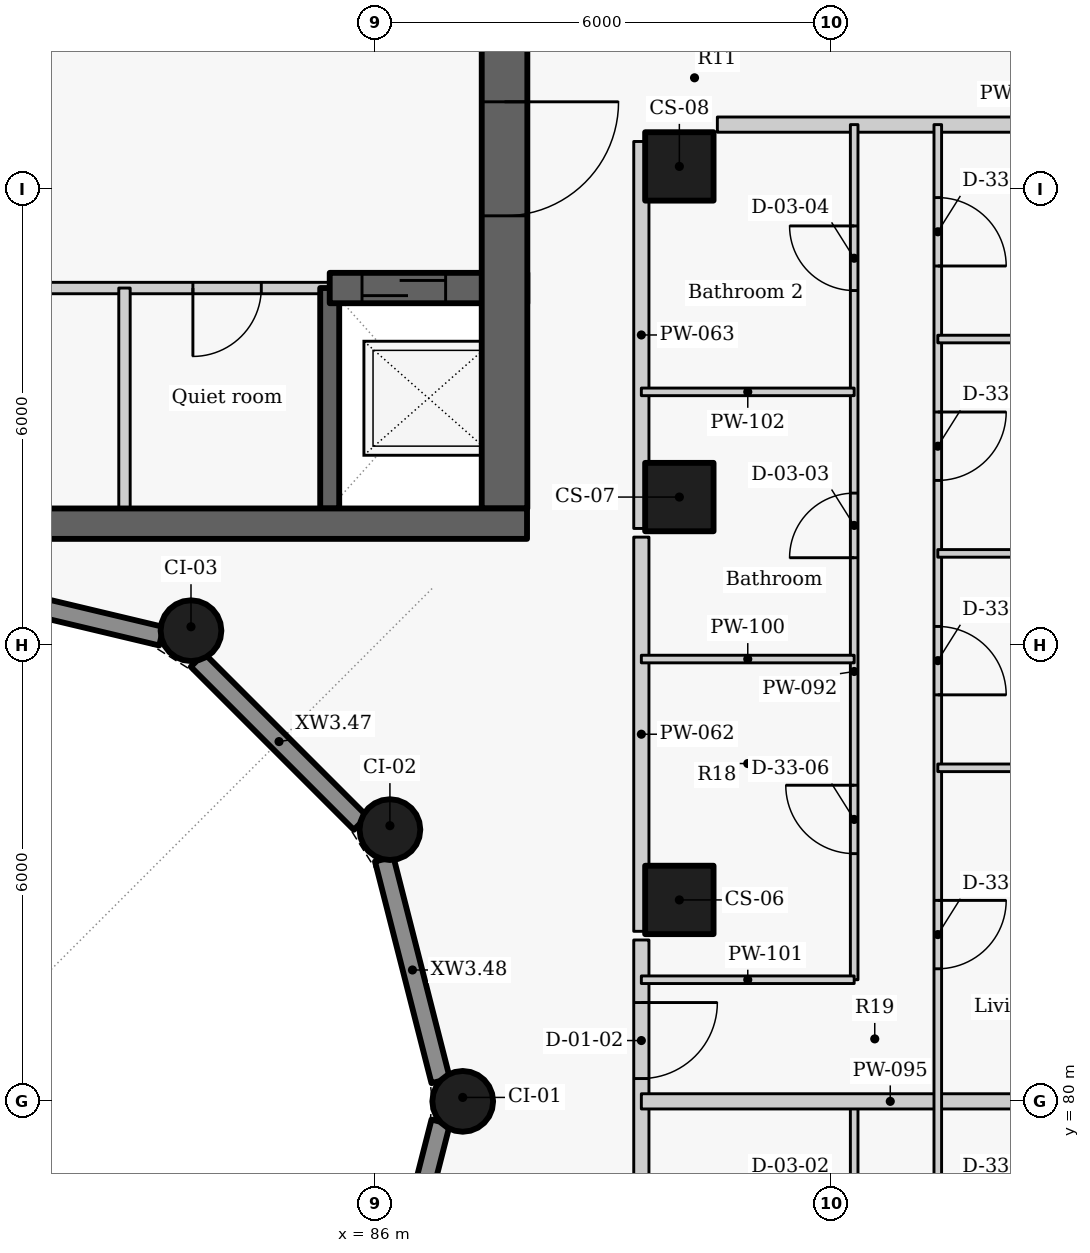
"""IFC4 building model, lengths in metres.
Left out: names, types, materials, properties, quantities, classifications, styles, units other than length and angle.
Written with IfcOpenShell. Run it as: python <this file> out.ifc"""

import sys

from ifc_helpers import new_model, si_unit, direction, frame, frame_2d, origin, origin_2d, place, context, subcontext, project, spatial, rectangle, circle, extrude, element, fill, save


model = new_model("IFC4")
c1 = context("Model", 3, precision=1e-05, world=origin(), true_north=direction((0.0, 1.0)))
c2 = subcontext(c1, "Body", "Model", "MODEL_VIEW")
j1 = project(units=[si_unit("LENGTHUNIT", "METRE"), si_unit("PLANEANGLEUNIT", "RADIAN")], contexts=[c1])
p1 = place(None, origin())
s1 = spatial("IfcSite", under=j1, at=p1, CompositionType="ELEMENT")
p2 = place(p1, origin())
s2 = spatial("IfcBuilding", under=s1, at=p2, CompositionType="ELEMENT")
p3 = place(p2, frame((0.0, 0.0, 229.5)))
s3 = spatial("IfcBuildingStorey", under=s2, at=p3, CompositionType="ELEMENT", Elevation=229.5)
for number, where, z_axis, x_axis in (
    (1, (90.0, 82.65, 0.0), (0.0, 0.0, 1.0), (0.0, 1.0, 0.0)),
    (2, (90.0, 87.95, 0.0), (0.0, 0.0, 1.0), (0.0, 1.0, 0.0)),
    (3, (90.0, 92.3, 0.0), (0.0, 0.0, 1.0), (0.0, 1.0, 0.0)),
):
    element("IfcColumn", number, at=place(p3, frame(where, z_axis=z_axis, x_axis=x_axis)), inside=s3, PredefinedType="COLUMN", context=c2, shape_type="SweptSolid", body=[
        extrude(rectangle(XDim=0.9, YDim=0.9, at=origin_2d()), origin(), (0.0, 0.0, 1.0), 3.3),
    ])
for number, where, z_axis, x_axis in (
    (4, (87.15, 80.0, 0.0), (0.0, 0.0, 1.0), (0.0, 1.0, 0.0)),
    (5, (86.192, 83.575, 0.0), (0.0, 0.0, 1.0), (-0.5, 0.866, 0.0)),
    (6, (83.575, 86.192, 0.0), (0.0, 0.0, 1.0), (-0.866, 0.5, 0.0)),
):
    element("IfcColumn", number, at=place(p3, frame(where, z_axis=z_axis, x_axis=x_axis)), inside=s3, PredefinedType="COLUMN", context=c2, shape_type="SweptSolid", body=[
        extrude(circle(Radius=0.4, at=origin_2d()), origin(), (0.0, 0.0, 1.0), 3.3),
    ])
p4 = place(p3, frame((86.86, 79.73, 0.0), z_axis=(0.0, 0.0, 1.0), x_axis=(-0.247055971283, -0.969001211069, 0.0)))
e7 = element("IfcWall", 7, at=p4, inside=s3, PredefinedType="SOLIDWALL", context=c2, shape_type="SweptSolid", body=[
    extrude(rectangle(XDim=3.01, YDim=0.25, at=frame_2d((1.505, 0.0))), origin(), (0.0, 0.0, 1.0), 2.425),
])
p5 = place(p3, frame((80.029, 86.872, 0.0), z_axis=(0.0, 0.0, 1.0), x_axis=(0.972773113459, -0.231759508395, 0.0)))
e8 = element("IfcWall", 8, at=p5, inside=s3, PredefinedType="SOLIDWALL", context=c2, shape_type="SweptSolid", body=[
    extrude(rectangle(XDim=3.246, YDim=0.25, at=frame_2d((1.623, 0.0))), origin(), (0.0, 0.0, 1.0), 2.425),
])
p6 = place(p3, frame((83.661, 85.806, 0.0), z_axis=(0.0, 0.0, 1.0), x_axis=(0.707106781187, -0.707106781187, 0.0)))
e9 = element("IfcWall", 9, at=p6, inside=s3, PredefinedType="SOLIDWALL", context=c2, shape_type="SweptSolid", body=[
    extrude(rectangle(XDim=3.033, YDim=0.25, at=frame_2d((1.517, 0.0))), origin(), (0.0, 0.0, 1.0), 2.425),
])
p7 = place(p3, frame((86.117, 83.187, 0.0), z_axis=(0.0, 0.0, 1.0), x_axis=(0.247055971283, -0.969001211069, 0.0)))
e10 = element("IfcWall", 10, at=p7, inside=s3, PredefinedType="SOLIDWALL", context=c2, shape_type="SweptSolid", body=[
    extrude(rectangle(XDim=3.01, YDim=0.25, at=frame_2d((1.505, 0.0))), origin(), (0.0, 0.0, 1.0), 2.425),
])
p8 = place(p3, frame((85.4, 90.7, 0.0), z_axis=(0.0, 0.0, 1.0), x_axis=(-1.0, 0.0, 0.0)))
e11 = element("IfcWall", 11, at=p8, inside=s3, PredefinedType="PARTITIONING", context=c2, shape_type="SweptSolid", body=[
    extrude(rectangle(XDim=13.4, YDim=0.15, at=frame_2d((6.7, 0.0))), origin(), (0.0, 0.0, 1.0), 3.025),
])
p9 = place(p8, frame((11.325, 0.0, 0.0)))
e12 = element("IfcOpeningElement", 12, at=p9, cuts=e11, PredefinedType="OPENING", context=c2, shape_type="SweptSolid", body=[
    extrude(rectangle(XDim=0.9, YDim=2.1, at=frame_2d((0.45, 1.05))), frame((0.0, 0.085, 0.0), z_axis=(0.0, -1.0, 0.0), x_axis=(1.0, 0.0, 0.0)), (0.0, 0.0, 1.0), 0.17),
])
p10 = place(p8, frame((6.3, 0.0, 0.0)))
e13 = element("IfcOpeningElement", 13, at=p10, cuts=e11, PredefinedType="OPENING", context=c2, shape_type="SweptSolid", body=[
    extrude(rectangle(XDim=0.9, YDim=2.1, at=frame_2d((0.45, 1.05))), frame((0.0, 0.085, 0.0), z_axis=(0.0, -1.0, 0.0), x_axis=(1.0, 0.0, 0.0)), (0.0, 0.0, 1.0), 0.17),
])
p11 = place(p8, frame((0.9, 0.0, 0.0)))
e14 = element("IfcOpeningElement", 14, at=p11, cuts=e11, PredefinedType="OPENING", context=c2, shape_type="SweptSolid", body=[
    extrude(rectangle(XDim=0.9, YDim=2.1, at=frame_2d((0.45, 1.05))), frame((0.0, 0.085, 0.0), z_axis=(0.0, -1.0, 0.0), x_axis=(1.0, 0.0, 0.0)), (0.0, 0.0, 1.0), 0.17),
])
p12 = place(p3, frame((85.4, 87.8, -0.275), z_axis=(0.0, 0.0, 1.0), x_axis=(0.0, 1.0, 0.0)))
e15 = element("IfcWall", 15, at=p12, inside=s3, PredefinedType="SHEAR", context=c2, shape_type="SweptSolid", body=[
    extrude(rectangle(XDim=2.9, YDim=0.25, at=frame_2d((1.45, 0.0))), origin(), (0.0, 0.0, 1.0), 3.3),
])
p13 = place(p3, frame((85.4, 90.7, -0.275), z_axis=(0.0, 0.0, 1.0), x_axis=(1.0, 0.0, 0.0)))
e16 = element("IfcWall", 16, at=p13, inside=s3, PredefinedType="SHEAR", context=c2, shape_type="SweptSolid", body=[
    extrude(rectangle(XDim=2.6, YDim=0.4, at=frame_2d((1.3, 0.0))), origin(), (0.0, 0.0, 1.0), 3.3),
])
p14 = place(p13, frame((0.425, 0.0, 0.275)))
e17 = element("IfcOpeningElement", 17, at=p14, cuts=e16, PredefinedType="OPENING", context=c2, shape_type="SweptSolid", body=[
    extrude(rectangle(XDim=1.1, YDim=2.1, at=frame_2d((0.55, 1.05))), frame((0.0, 0.21, 0.0), z_axis=(0.0, -1.0, 0.0), x_axis=(1.0, 0.0, 0.0)), (0.0, 0.0, 1.0), 0.42),
])
p15 = place(p3, frame((87.7, 102.05, -0.275), z_axis=(0.0, 0.0, 1.0), x_axis=(0.0, -1.0, 0.0)))
e18 = element("IfcWall", 18, at=p15, inside=s3, PredefinedType="SHEAR", context=c2, shape_type="SweptSolid", body=[
    extrude(rectangle(XDim=14.25, YDim=0.6, at=frame_2d((7.125, 0.0))), origin(), (0.0, 0.0, 1.0), 3.3),
])
p16 = place(p15, frame((8.9, 0.0, 0.275)))
e19 = element("IfcOpeningElement", 19, at=p16, cuts=e18, PredefinedType="OPENING", context=c2, shape_type="SweptSolid", body=[
    extrude(rectangle(XDim=1.5, YDim=2.1, at=frame_2d((0.75, 1.05))), frame((0.0, 0.31, 0.0), z_axis=(0.0, -1.0, 0.0), x_axis=(1.0, 0.0, 0.0)), (0.0, 0.0, 1.0), 0.62),
])
p17 = place(p15, frame((2.025, 0.0, 0.275)))
e20 = element("IfcOpeningElement", 20, at=p17, cuts=e18, PredefinedType="OPENING", context=c2, shape_type="SweptSolid", body=[
    extrude(rectangle(XDim=1.1, YDim=2.1, at=frame_2d((0.55, 1.05))), frame((0.0, 0.31, 0.0), z_axis=(0.0, -1.0, 0.0), x_axis=(1.0, 0.0, 0.0)), (0.0, 0.0, 1.0), 0.62),
])
p18 = place(p3, frame((82.7, 87.8, 0.0), z_axis=(0.0, 0.0, 1.0), x_axis=(0.0, 1.0, 0.0)))
e21 = element("IfcWall", 21, at=p18, inside=s3, PredefinedType="PARTITIONING", context=c2, shape_type="SweptSolid", body=[
    extrude(rectangle(XDim=2.9, YDim=0.15, at=frame_2d((1.45, 0.0))), origin(), (0.0, 0.0, 1.0), 3.025),
])
p19 = place(p3, frame((89.5, 82.123, 0.0), z_axis=(0.0, 0.0, 1.0), x_axis=(0.0, -1.0, 0.0)))
e22 = element("IfcWall", 22, at=p19, inside=s3, PredefinedType="PARTITIONING", context=c2, shape_type="SweptSolid", body=[
    extrude(rectangle(XDim=10.486, YDim=0.2, at=frame_2d((5.243, 0.0))), origin(), (0.0, 0.0, 1.0), 3.025),
])
p20 = place(p19, frame((0.823, 0.0, 0.0)))
e23 = element("IfcOpeningElement", 23, at=p20, cuts=e22, PredefinedType="OPENING", context=c2, shape_type="SweptSolid", body=[
    extrude(rectangle(XDim=1.0, YDim=2.1, at=frame_2d((0.5, 1.05))), frame((0.0, 0.11, 0.0), z_axis=(0.0, -1.0, 0.0), x_axis=(1.0, 0.0, 0.0)), (0.0, 0.0, 1.0), 0.22),
])
p21 = place(p3, frame((89.5, 82.237, 0.0), z_axis=(0.0, 0.0, 1.0), x_axis=(0.0, 1.0, 0.0)))
e24 = element("IfcWall", 24, at=p21, inside=s3, PredefinedType="PARTITIONING", context=c2, shape_type="SweptSolid", body=[
    extrude(rectangle(XDim=5.186, YDim=0.2, at=frame_2d((2.593, 0.0))), origin(), (0.0, 0.0, 1.0), 3.025),
])
p22 = place(p3, frame((89.5, 87.537, 0.0), z_axis=(0.0, 0.0, 1.0), x_axis=(0.0, 1.0, 0.0)))
e25 = element("IfcWall", 25, at=p22, inside=s3, PredefinedType="PARTITIONING", context=c2, shape_type="SweptSolid", body=[
    extrude(rectangle(XDim=5.091, YDim=0.2, at=frame_2d((2.545, 0.0))), origin(), (0.0, 0.0, 1.0), 3.025),
])
p23 = place(p3, frame((90.5, 92.85, 0.0), z_axis=(0.0, 0.0, 1.0), x_axis=(1.0, 0.0, 0.0)))
e26 = element("IfcWall", 26, at=p23, inside=s3, PredefinedType="PARTITIONING", context=c2, shape_type="SweptSolid", body=[
    extrude(rectangle(XDim=7.889, YDim=0.2, at=frame_2d((3.944, 0.0))), origin(), (0.0, 0.0, 1.0), 2.405),
])
p24 = place(p3, frame((92.3, 70.2, 0.0), z_axis=(0.0, 0.0, 1.0), x_axis=(0.0, 1.0, 0.0)))
e27 = element("IfcWall", 27, at=p24, inside=s3, PredefinedType="PARTITIONING", context=c2, shape_type="SweptSolid", body=[
    extrude(rectangle(XDim=9.8, YDim=0.1, at=frame_2d((4.9, 0.0))), origin(), (0.0, 0.0, 1.0), 3.025),
])
p25 = place(p24, frame((1.388, 0.0, 0.0)))
e28 = element("IfcOpeningElement", 28, at=p25, cuts=e27, PredefinedType="OPENING", context=c2, shape_type="SweptSolid", body=[
    extrude(rectangle(XDim=0.9, YDim=2.1, at=frame_2d((0.45, 1.05))), frame((0.0, 0.06, 0.0), z_axis=(0.0, -1.0, 0.0), x_axis=(1.0, 0.0, 0.0)), (0.0, 0.0, 1.0), 0.12),
])
p26 = place(p24, frame((4.781, 0.0, 0.0)))
e29 = element("IfcOpeningElement", 29, at=p26, cuts=e27, PredefinedType="OPENING", context=c2, shape_type="SweptSolid", body=[
    extrude(rectangle(XDim=0.85, YDim=2.1, at=frame_2d((0.425, 1.05))), frame((0.0, 0.06, 0.0), z_axis=(0.0, -1.0, 0.0), x_axis=(1.0, 0.0, 0.0)), (0.0, 0.0, 1.0), 0.12),
])
p27 = place(p24, frame((7.844, 0.0, 0.0)))
e30 = element("IfcOpeningElement", 30, at=p27, cuts=e27, PredefinedType="OPENING", context=c2, shape_type="SweptSolid", body=[
    extrude(rectangle(XDim=0.85, YDim=2.1, at=frame_2d((0.425, 1.05))), frame((0.0, 0.06, 0.0), z_axis=(0.0, -1.0, 0.0), x_axis=(1.0, 0.0, 0.0)), (0.0, 0.0, 1.0), 0.12),
])
p28 = place(p3, frame((92.3, 81.6, 0.0), z_axis=(0.0, 0.0, 1.0), x_axis=(0.0, 1.0, 0.0)))
e31 = element("IfcWall", 31, at=p28, inside=s3, PredefinedType="PARTITIONING", context=c2, shape_type="SweptSolid", body=[
    extrude(rectangle(XDim=11.25, YDim=0.1, at=frame_2d((5.625, 0.0))), origin(), (0.0, 0.0, 1.0), 3.025),
])
p29 = place(p28, frame((1.659, 0.0, 0.0)))
e32 = element("IfcOpeningElement", 32, at=p29, cuts=e31, PredefinedType="OPENING", context=c2, shape_type="SweptSolid", body=[
    extrude(rectangle(XDim=0.9, YDim=2.1, at=frame_2d((0.45, 1.05))), frame((0.0, 0.06, 0.0), z_axis=(0.0, -1.0, 0.0), x_axis=(1.0, 0.0, 0.0)), (0.0, 0.0, 1.0), 0.12),
])
p30 = place(p28, frame((5.552, 0.0, 0.0)))
e33 = element("IfcOpeningElement", 33, at=p30, cuts=e31, PredefinedType="OPENING", context=c2, shape_type="SweptSolid", body=[
    extrude(rectangle(XDim=0.85, YDim=2.1, at=frame_2d((0.425, 1.05))), frame((0.0, 0.06, 0.0), z_axis=(0.0, -1.0, 0.0), x_axis=(1.0, 0.0, 0.0)), (0.0, 0.0, 1.0), 0.12),
])
p31 = place(p28, frame((9.067, 0.0, 0.0)))
e34 = element("IfcOpeningElement", 34, at=p31, cuts=e31, PredefinedType="OPENING", context=c2, shape_type="SweptSolid", body=[
    extrude(rectangle(XDim=0.85, YDim=2.1, at=frame_2d((0.425, 1.05))), frame((0.0, 0.06, 0.0), z_axis=(0.0, -1.0, 0.0), x_axis=(1.0, 0.0, 0.0)), (0.0, 0.0, 1.0), 0.12),
])
p32 = place(p3, frame((89.5, 80.0, 0.0), z_axis=(0.0, 0.0, 1.0), x_axis=(1.0, 0.0, 0.0)))
e35 = element("IfcWall", 35, at=p32, inside=s3, PredefinedType="PARTITIONING", context=c2, shape_type="SweptSolid", body=[
    extrude(rectangle(XDim=6.55, YDim=0.2, at=frame_2d((3.275, 0.0))), origin(), (0.0, 0.0, 1.0), 2.405),
])
p33 = place(p3, frame((93.4, 92.85, 0.0), z_axis=(0.0, 0.0, 1.0), x_axis=(0.0, -1.0, 0.0)))
e36 = element("IfcWall", 36, at=p33, inside=s3, PredefinedType="PARTITIONING", context=c2, shape_type="SweptSolid", body=[
    extrude(rectangle(XDim=26.75, YDim=0.1, at=frame_2d((13.375, 0.0))), origin(), (0.0, 0.0, 1.0), 3.025),
])
p34 = place(p33, frame((23.927, 0.0, 0.0)))
e37 = element("IfcOpeningElement", 37, at=p34, cuts=e36, PredefinedType="OPENING", context=c2, shape_type="SweptSolid", body=[
    extrude(rectangle(XDim=0.9, YDim=2.1, at=frame_2d((0.45, 1.05))), frame((0.0, 0.06, 0.0), z_axis=(0.0, -1.0, 0.0), x_axis=(1.0, 0.0, 0.0)), (0.0, 0.0, 1.0), 0.12),
])
p35 = place(p33, frame((20.028, 0.0, 0.0)))
e38 = element("IfcOpeningElement", 38, at=p35, cuts=e36, PredefinedType="OPENING", context=c2, shape_type="SweptSolid", body=[
    extrude(rectangle(XDim=0.9, YDim=2.1, at=frame_2d((0.45, 1.05))), frame((0.0, 0.06, 0.0), z_axis=(0.0, -1.0, 0.0), x_axis=(1.0, 0.0, 0.0)), (0.0, 0.0, 1.0), 0.12),
])
p36 = place(p33, frame((16.977, 0.0, 0.0)))
e39 = element("IfcOpeningElement", 39, at=p36, cuts=e36, PredefinedType="OPENING", context=c2, shape_type="SweptSolid", body=[
    extrude(rectangle(XDim=0.9, YDim=2.1, at=frame_2d((0.45, 1.05))), frame((0.0, 0.06, 0.0), z_axis=(0.0, -1.0, 0.0), x_axis=(1.0, 0.0, 0.0)), (0.0, 0.0, 1.0), 0.12),
])
p37 = place(p33, frame((13.926, 0.0, 0.0)))
e40 = element("IfcOpeningElement", 40, at=p37, cuts=e36, PredefinedType="OPENING", context=c2, shape_type="SweptSolid", body=[
    extrude(rectangle(XDim=0.9, YDim=2.1, at=frame_2d((0.45, 1.05))), frame((0.0, 0.06, 0.0), z_axis=(0.0, -1.0, 0.0), x_axis=(1.0, 0.0, 0.0)), (0.0, 0.0, 1.0), 0.12),
])
p38 = place(p33, frame((10.206, 0.0, 0.0)))
e41 = element("IfcOpeningElement", 41, at=p38, cuts=e36, PredefinedType="OPENING", context=c2, shape_type="SweptSolid", body=[
    extrude(rectangle(XDim=0.9, YDim=2.1, at=frame_2d((0.45, 1.05))), frame((0.0, 0.06, 0.0), z_axis=(0.0, -1.0, 0.0), x_axis=(1.0, 0.0, 0.0)), (0.0, 0.0, 1.0), 0.12),
])
p39 = place(p33, frame((6.602, 0.0, 0.0)))
e42 = element("IfcOpeningElement", 42, at=p39, cuts=e36, PredefinedType="OPENING", context=c2, shape_type="SweptSolid", body=[
    extrude(rectangle(XDim=0.9, YDim=2.1, at=frame_2d((0.45, 1.05))), frame((0.0, 0.06, 0.0), z_axis=(0.0, -1.0, 0.0), x_axis=(1.0, 0.0, 0.0)), (0.0, 0.0, 1.0), 0.12),
])
p40 = place(p33, frame((3.781, 0.0, 0.0)))
e43 = element("IfcOpeningElement", 43, at=p40, cuts=e36, PredefinedType="OPENING", context=c2, shape_type="SweptSolid", body=[
    extrude(rectangle(XDim=0.9, YDim=2.1, at=frame_2d((0.45, 1.05))), frame((0.0, 0.06, 0.0), z_axis=(0.0, -1.0, 0.0), x_axis=(1.0, 0.0, 0.0)), (0.0, 0.0, 1.0), 0.12),
])
p41 = place(p33, frame((0.96, 0.0, 0.0)))
e44 = element("IfcOpeningElement", 44, at=p41, cuts=e36, PredefinedType="OPENING", context=c2, shape_type="SweptSolid", body=[
    extrude(rectangle(XDim=0.9, YDim=2.1, at=frame_2d((0.45, 1.05))), frame((0.0, 0.06, 0.0), z_axis=(0.0, -1.0, 0.0), x_axis=(1.0, 0.0, 0.0)), (0.0, 0.0, 1.0), 0.12),
])
for number, where, z_axis, x_axis in (
    (45, (89.5, 85.819, 0.0), (0.0, 0.0, 1.0), (1.0, 0.0, 0.0)),
    (46, (89.5, 81.6, 0.0), (0.0, 0.0, 1.0), (1.0, 0.0, 0.0)),
    (47, (89.5, 89.334, 0.0), (0.0, 0.0, 1.0), (1.0, 0.0, 0.0)),
):
    element("IfcWall", number, at=place(p3, frame(where, z_axis=z_axis, x_axis=x_axis)), inside=s3, PredefinedType="PARTITIONING", context=c2, shape_type="SweptSolid", body=[
        extrude(rectangle(XDim=2.8, YDim=0.1, at=frame_2d((1.4, 0.0))), origin(), (0.0, 0.0, 1.0), 2.505),
    ])
p42 = place(p3, frame((93.4, 84.388, 0.0), z_axis=(0.0, 0.0, 1.0), x_axis=(1.0, 0.0, 0.0)))
e48 = element("IfcWall", 48, at=p42, inside=s3, PredefinedType="PARTITIONING", context=c2, shape_type="SweptSolid", body=[
    extrude(rectangle(XDim=9.875, YDim=0.1, at=frame_2d((4.937, 0.0))), origin(), (0.0, 0.0, 1.0), 2.405),
])
p43 = place(p3, frame((93.4, 87.209, 0.0), z_axis=(0.0, 0.0, 1.0), x_axis=(1.0, 0.0, 0.0)))
e49 = element("IfcWall", 49, at=p43, inside=s3, PredefinedType="PARTITIONING", context=c2, shape_type="SweptSolid", body=[
    extrude(rectangle(XDim=7.53, YDim=0.1, at=frame_2d((3.765, 0.0))), origin(), (0.0, 0.0, 1.0), 3.025),
])
p44 = place(p3, frame((93.4, 90.029, 0.0), z_axis=(0.0, 0.0, 1.0), x_axis=(1.0, 0.0, 0.0)))
e50 = element("IfcWall", 50, at=p44, inside=s3, PredefinedType="PARTITIONING", context=c2, shape_type="SweptSolid", body=[
    extrude(rectangle(XDim=6.617, YDim=0.1, at=frame_2d((3.309, 0.0))), origin(), (0.0, 0.0, 1.0), 2.405),
])
p45 = place(p3, frame((72.004, 87.6, -0.275), z_axis=(0.0, 0.0, 1.0), x_axis=(1.0, 0.0, 0.0)))
e51 = element("IfcWall", 51, at=p45, inside=s3, PredefinedType="SHEAR", context=c2, shape_type="SweptSolid", body=[
    extrude(rectangle(XDim=15.992, YDim=0.4, at=frame_2d((7.996, 0.0))), origin(), (0.0, 0.0, 1.0), 3.3),
])
p46 = place(p14, origin())
e52 = element("IfcDoor", 52, at=p46, inside=s3, OperationType="SLIDING_TO_LEFT", PredefinedType="DOOR", context=c2, shape_type="SweptSolid", body=[
    extrude(rectangle(XDim=1.1, YDim=2.1, at=frame_2d((0.55, 1.05))), frame((0.0, 0.025, 0.0), z_axis=(0.0, -1.0, 0.0), x_axis=(1.0, 0.0, 0.0)), (0.0, 0.0, 1.0), 0.05),
])
fill(e17, e52)
p47 = place(p11, origin())
e53 = element("IfcDoor", 53, at=p47, inside=s3, OperationType="SINGLE_SWING_RIGHT", PredefinedType="DOOR", context=c2, shape_type="SweptSolid", body=[
    extrude(rectangle(XDim=0.9, YDim=2.1, at=frame_2d((0.45, 1.05))), frame((0.0, 0.025, 0.0), z_axis=(0.0, -1.0, 0.0), x_axis=(1.0, 0.0, 0.0)), (0.0, 0.0, 1.0), 0.05),
])
fill(e14, e53)
p48 = place(p20, origin())
e54 = element("IfcDoor", 54, at=p48, inside=s3, OperationType="SINGLE_SWING_LEFT", PredefinedType="DOOR", context=c2, shape_type="SweptSolid", body=[
    extrude(rectangle(XDim=1.0, YDim=2.1, at=frame_2d((0.5, 1.05))), frame((0.0, 0.025, 0.0), z_axis=(0.0, -1.0, 0.0), x_axis=(1.0, 0.0, 0.0)), (0.0, 0.0, 1.0), 0.05),
])
fill(e23, e54)
p49 = place(p29, origin())
e55 = element("IfcDoor", 55, at=p49, inside=s3, OperationType="SINGLE_SWING_RIGHT", PredefinedType="DOOR", context=c2, shape_type="SweptSolid", body=[
    extrude(rectangle(XDim=0.9, YDim=2.1, at=frame_2d((0.45, 1.05))), frame((0.0, 0.025, 0.0), z_axis=(0.0, -1.0, 0.0), x_axis=(1.0, 0.0, 0.0)), (0.0, 0.0, 1.0), 0.05),
])
fill(e32, e55)
p50 = place(p30, origin())
e56 = element("IfcDoor", 56, at=p50, inside=s3, OperationType="SINGLE_SWING_LEFT", PredefinedType="DOOR", context=c2, shape_type="SweptSolid", body=[
    extrude(rectangle(XDim=0.85, YDim=2.1, at=frame_2d((0.425, 1.05))), frame((0.0, 0.025, 0.0), z_axis=(0.0, -1.0, 0.0), x_axis=(1.0, 0.0, 0.0)), (0.0, 0.0, 1.0), 0.05),
])
fill(e33, e56)
p51 = place(p31, origin())
e57 = element("IfcDoor", 57, at=p51, inside=s3, OperationType="SINGLE_SWING_RIGHT", PredefinedType="DOOR", context=c2, shape_type="SweptSolid", body=[
    extrude(rectangle(XDim=0.85, YDim=2.1, at=frame_2d((0.425, 1.05))), frame((0.0, 0.025, 0.0), z_axis=(0.0, -1.0, 0.0), x_axis=(1.0, 0.0, 0.0)), (0.0, 0.0, 1.0), 0.05),
])
fill(e34, e57)
p52 = place(p38, origin())
e58 = element("IfcDoor", 58, at=p52, inside=s3, OperationType="SINGLE_SWING_LEFT", PredefinedType="DOOR", context=c2, shape_type="SweptSolid", body=[
    extrude(rectangle(XDim=0.9, YDim=2.1, at=frame_2d((0.45, 1.05))), frame((0.0, 0.025, 0.0), z_axis=(0.0, -1.0, 0.0), x_axis=(1.0, 0.0, 0.0)), (0.0, 0.0, 1.0), 0.05),
])
fill(e41, e58)
p53 = place(p39, origin())
e59 = element("IfcDoor", 59, at=p53, inside=s3, OperationType="SINGLE_SWING_RIGHT", PredefinedType="DOOR", context=c2, shape_type="SweptSolid", body=[
    extrude(rectangle(XDim=0.9, YDim=2.1, at=frame_2d((0.45, 1.05))), frame((0.0, 0.025, 0.0), z_axis=(0.0, -1.0, 0.0), x_axis=(1.0, 0.0, 0.0)), (0.0, 0.0, 1.0), 0.05),
])
fill(e42, e59)
p54 = place(p40, origin())
e60 = element("IfcDoor", 60, at=p54, inside=s3, OperationType="SINGLE_SWING_LEFT", PredefinedType="DOOR", context=c2, shape_type="SweptSolid", body=[
    extrude(rectangle(XDim=0.9, YDim=2.1, at=frame_2d((0.45, 1.05))), frame((0.0, 0.025, 0.0), z_axis=(0.0, -1.0, 0.0), x_axis=(1.0, 0.0, 0.0)), (0.0, 0.0, 1.0), 0.05),
])
fill(e43, e60)
p55 = place(p41, origin())
e61 = element("IfcDoor", 61, at=p55, inside=s3, OperationType="SINGLE_SWING_RIGHT", PredefinedType="DOOR", context=c2, shape_type="SweptSolid", body=[
    extrude(rectangle(XDim=0.9, YDim=2.1, at=frame_2d((0.45, 1.05))), frame((0.0, 0.025, 0.0), z_axis=(0.0, -1.0, 0.0), x_axis=(1.0, 0.0, 0.0)), (0.0, 0.0, 1.0), 0.05),
])
fill(e44, e61)
p56 = place(p16, origin())
e62 = element("IfcDoor", 62, at=p56, inside=s3, OperationType="DOUBLE_DOOR_SINGLE_SWING", PredefinedType="DOOR", context=c2, shape_type="SweptSolid", body=[
    extrude(rectangle(XDim=1.5, YDim=2.1, at=frame_2d((0.75, 1.05))), frame((0.0, 0.025, 0.0), z_axis=(0.0, -1.0, 0.0), x_axis=(1.0, 0.0, 0.0)), (0.0, 0.0, 1.0), 0.05),
])
fill(e19, e62)
save(model, sys.argv[1])
